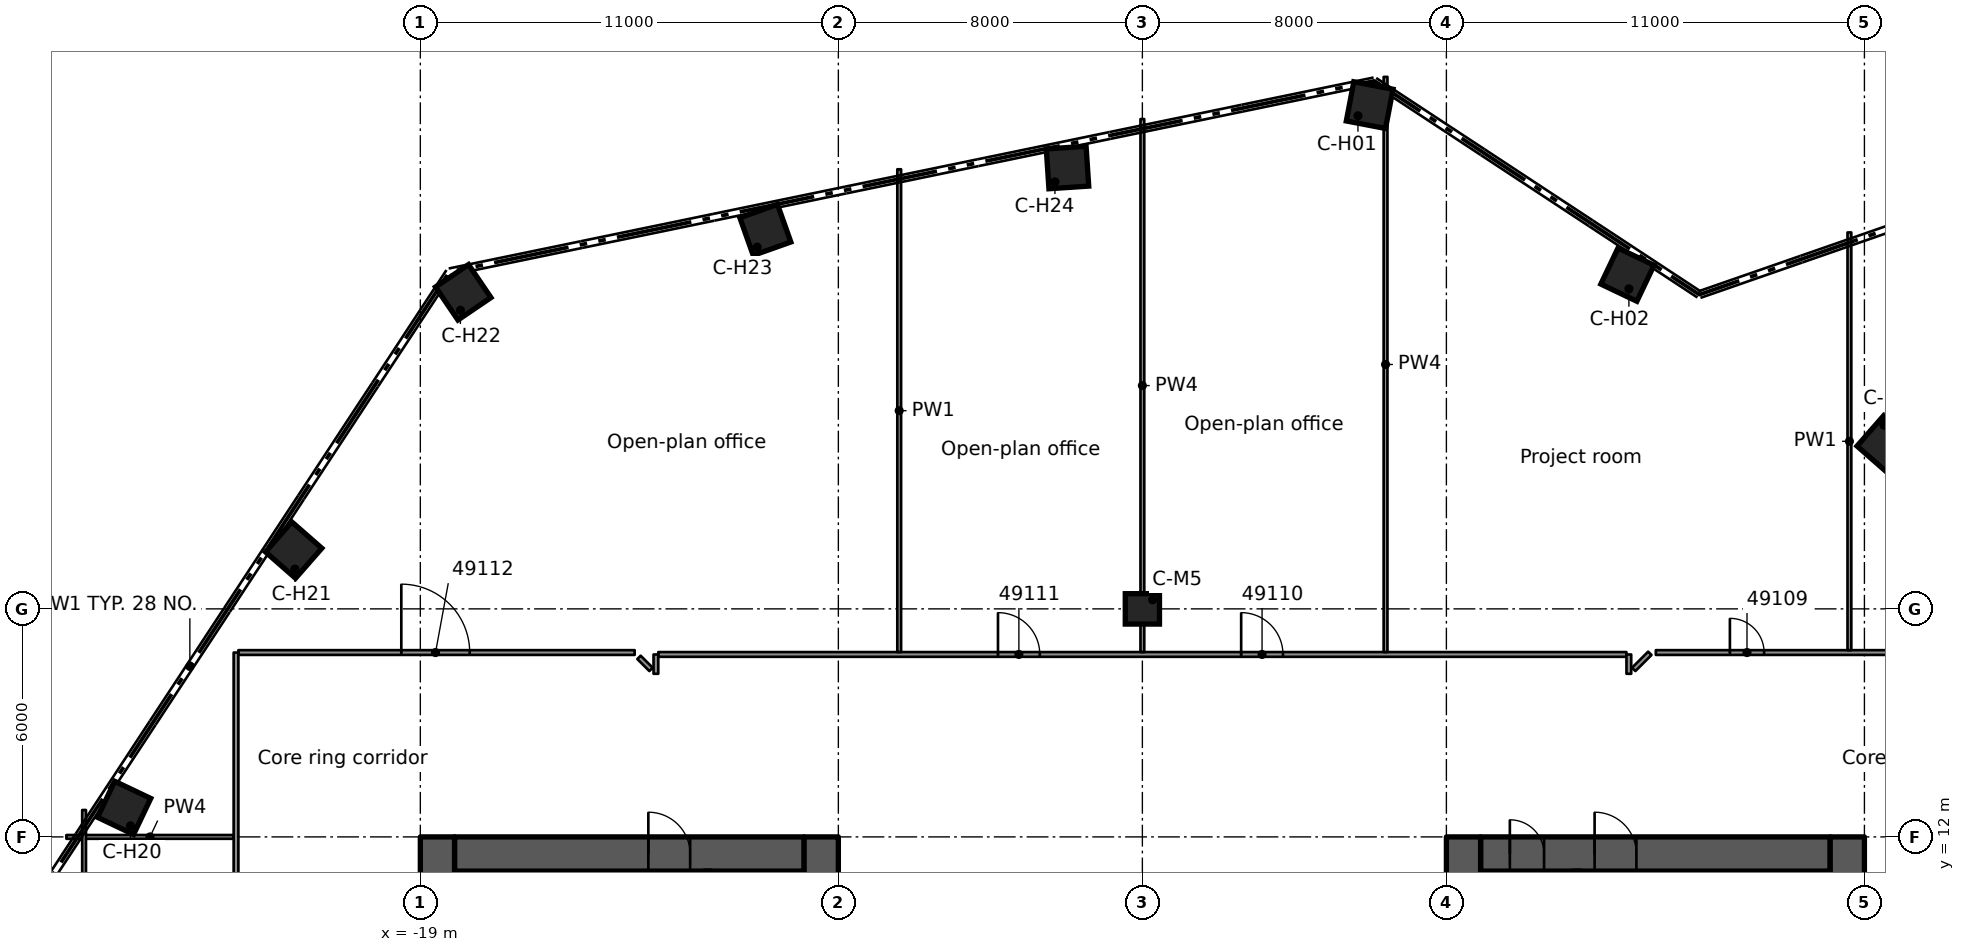
"""IFC4 building model, lengths in metres.
Left out: names, types, materials, properties, quantities, classifications, styles, units other than length and angle.
Written with IfcOpenShell. Run it as: python <this file> out.ifc"""

import sys

from ifc_helpers import new_model, si_unit, direction, frame, frame_2d, origin, origin_2d, place, context, subcontext, project, spatial, rectangle, extrude, element, fill, save


model = new_model("IFC4")
c1 = context("Model", 3, precision=1e-05, world=origin(), true_north=direction((0.0, 1.0)))
c2 = subcontext(c1, "Body", "Model", "MODEL_VIEW")
j1 = project(units=[si_unit("LENGTHUNIT", "METRE"), si_unit("PLANEANGLEUNIT", "RADIAN")], contexts=[c1])
p1 = place(None, origin())
s1 = spatial("IfcSite", under=j1, at=p1, CompositionType="ELEMENT")
p2 = place(p1, origin())
s2 = spatial("IfcBuilding", under=s1, at=p2, CompositionType="ELEMENT")
p3 = place(p2, frame((0.0, 0.0, 246.0)))
s3 = spatial("IfcBuildingStorey", under=s2, at=p3, CompositionType="ELEMENT", Elevation=246.0)
p4 = place(p3, frame((-18.1, 11.55, 0.0), z_axis=(0.0, 0.0, 1.0), x_axis=(1.0, 0.0, 0.0)))
e1 = element("IfcWall", 1, at=p4, inside=s3, PredefinedType="SHEAR", context=c2, shape_type="SweptSolid", body=[
    extrude(rectangle(XDim=9.2, YDim=0.9, at=frame_2d((4.6, 0.0))), origin(), (0.0, 0.0, 1.0), 3.5),
])
p5 = place(p4, frame((5.1, 0.0, 0.0)))
e2 = element("IfcOpeningElement", 2, at=p5, cuts=e1, PredefinedType="OPENING", context=c2, shape_type="SweptSolid", body=[
    extrude(rectangle(XDim=1.1, YDim=2.1, at=frame_2d((0.55, 1.05))), frame((0.0, 0.46, 0.0), z_axis=(0.0, -1.0, 0.0), x_axis=(1.0, 0.0, 0.0)), (0.0, 0.0, 1.0), 0.92),
])
p6 = place(p3, frame((-18.55, -12.0, 0.0), z_axis=(0.0, 0.0, 1.0), x_axis=(0.0, 1.0, 0.0)))
e3 = element("IfcWall", 3, at=p6, inside=s3, PredefinedType="SHEAR", context=c2, shape_type="SweptSolid", body=[
    extrude(rectangle(XDim=24.0, YDim=0.9, at=frame_2d((12.0, 0.0))), origin(), (0.0, 0.0, 1.0), 3.5),
])
p7 = place(p6, frame((10.1, 0.0, 0.0)))
e4 = element("IfcOpeningElement", 4, at=p7, cuts=e3, PredefinedType="OPENING", context=c2, shape_type="SweptSolid", body=[
    extrude(rectangle(XDim=1.8, YDim=2.1, at=frame_2d((0.9, 1.05))), frame((0.0, 0.46, 0.0), z_axis=(0.0, -1.0, 0.0), x_axis=(1.0, 0.0, 0.0)), (0.0, 0.0, 1.0), 0.92),
])
p8 = place(p3, frame((-8.45, -12.0, 0.0), z_axis=(0.0, 0.0, 1.0), x_axis=(0.0, 1.0, 0.0)))
e5 = element("IfcWall", 5, at=p8, inside=s3, PredefinedType="SHEAR", context=c2, shape_type="SweptSolid", body=[
    extrude(rectangle(XDim=24.0, YDim=0.9, at=frame_2d((12.0, 0.0))), origin(), (0.0, 0.0, 1.0), 3.5),
])
p9 = place(p8, frame((9.6, 0.0, 0.0)))
e6 = element("IfcOpeningElement", 6, at=p9, cuts=e5, PredefinedType="OPENING", context=c2, shape_type="SweptSolid", body=[
    extrude(rectangle(XDim=1.8, YDim=2.1, at=frame_2d((0.9, 1.05))), frame((0.0, 0.46, 0.0), z_axis=(0.0, -1.0, 0.0), x_axis=(1.0, 0.0, 0.0)), (0.0, 0.0, 1.0), 0.92),
])
p10 = place(p8, frame((19.65, 0.0, 0.0)))
e7 = element("IfcOpeningElement", 7, at=p10, cuts=e5, PredefinedType="OPENING", context=c2, shape_type="SweptSolid", body=[
    extrude(rectangle(XDim=1.1, YDim=2.1, at=frame_2d((0.55, 1.05))), frame((0.0, 0.46, 0.0), z_axis=(0.0, -1.0, 0.0), x_axis=(1.0, 0.0, 0.0)), (0.0, 0.0, 1.0), 0.92),
])
p11 = place(p3, frame((8.9, 11.55, 0.0), z_axis=(0.0, 0.0, 1.0), x_axis=(1.0, 0.0, 0.0)))
e8 = element("IfcWall", 8, at=p11, inside=s3, PredefinedType="SHEAR", context=c2, shape_type="SweptSolid", body=[
    extrude(rectangle(XDim=9.2, YDim=0.9, at=frame_2d((4.6, 0.0))), origin(), (0.0, 0.0, 1.0), 3.5),
])
p12 = place(p11, frame((3.0, 0.0, 0.0)))
e9 = element("IfcOpeningElement", 9, at=p12, cuts=e8, PredefinedType="OPENING", context=c2, shape_type="SweptSolid", body=[
    extrude(rectangle(XDim=1.1, YDim=2.1, at=frame_2d((0.55, 1.05))), frame((0.0, 0.46, 0.0), z_axis=(0.0, -1.0, 0.0), x_axis=(1.0, 0.0, 0.0)), (0.0, 0.0, 1.0), 0.92),
])
p13 = place(p11, frame((0.77, 0.0, 0.0)))
e10 = element("IfcOpeningElement", 10, at=p13, cuts=e8, PredefinedType="OPENING", context=c2, shape_type="SweptSolid", body=[
    extrude(rectangle(XDim=0.9, YDim=2.1, at=frame_2d((0.45, 1.05))), frame((0.0, 0.46, 0.0), z_axis=(0.0, -1.0, 0.0), x_axis=(1.0, 0.0, 0.0)), (0.0, 0.0, 1.0), 0.92),
])
p14 = place(p3, frame((8.45, -12.0, 0.0), z_axis=(0.0, 0.0, 1.0), x_axis=(0.0, 1.0, 0.0)))
e11 = element("IfcWall", 11, at=p14, inside=s3, PredefinedType="SHEAR", context=c2, shape_type="SweptSolid", body=[
    extrude(rectangle(XDim=24.0, YDim=0.9, at=frame_2d((12.0, 0.0))), origin(), (0.0, 0.0, 1.0), 3.5),
])
p15 = place(p14, frame((12.6, 0.0, 0.0)))
e12 = element("IfcOpeningElement", 12, at=p15, cuts=e11, PredefinedType="OPENING", context=c2, shape_type="SweptSolid", body=[
    extrude(rectangle(XDim=1.8, YDim=2.1, at=frame_2d((0.9, 1.05))), frame((0.0, 0.46, 0.0), z_axis=(0.0, -1.0, 0.0), x_axis=(1.0, 0.0, 0.0)), (0.0, 0.0, 1.0), 0.92),
])
p16 = place(p14, frame((3.25, 0.0, 0.0)))
e13 = element("IfcOpeningElement", 13, at=p16, cuts=e11, PredefinedType="OPENING", context=c2, shape_type="SweptSolid", body=[
    extrude(rectangle(XDim=1.1, YDim=2.1, at=frame_2d((0.55, 1.05))), frame((0.0, 0.46, 0.0), z_axis=(0.0, -1.0, 0.0), x_axis=(1.0, 0.0, 0.0)), (0.0, 0.0, 1.0), 0.92),
])
p17 = place(p3, frame((18.55, -12.0, 0.0), z_axis=(0.0, 0.0, 1.0), x_axis=(0.0, 1.0, 0.0)))
e14 = element("IfcWall", 14, at=p17, inside=s3, PredefinedType="SHEAR", context=c2, shape_type="SweptSolid", body=[
    extrude(rectangle(XDim=24.0, YDim=0.9, at=frame_2d((12.0, 0.0))), origin(), (0.0, 0.0, 1.0), 3.5),
])
p18 = place(p17, frame((12.1, 0.0, 0.0)))
e15 = element("IfcOpeningElement", 15, at=p18, cuts=e14, PredefinedType="OPENING", context=c2, shape_type="SweptSolid", body=[
    extrude(rectangle(XDim=1.8, YDim=2.1, at=frame_2d((0.9, 1.05))), frame((0.0, 0.46, 0.0), z_axis=(0.0, -1.0, 0.0), x_axis=(1.0, 0.0, 0.0)), (0.0, 0.0, 1.0), 0.92),
])
for number, where, z_axis, x_axis in (
    (16, (5.981, 31.255, 0.0), (0.0, 0.0, 1.0), (0.188, 0.982, 0.0)),
    (17, (12.764, 26.794, 0.0), (0.0, 0.0, 1.0), (0.43, 0.903, 0.0)),
    (18, (19.547, 22.333, 0.0), (0.0, 0.0, 1.0), (0.659, 0.752, 0.0)),
    (19, (-26.794, 12.764, 0.0), (0.0, 0.0, 1.0), (-0.903, 0.43, 0.0)),
    (20, (-22.333, 19.547, 0.0), (0.0, 0.0, 1.0), (-0.752, 0.659, 0.0)),
    (21, (-17.871, 26.33, 0.0), (0.0, 0.0, 1.0), (-0.562, 0.827, 0.0)),
    (22, (-9.921, 27.972, 0.0), (0.0, 0.0, 1.0), (-0.334, 0.942, 0.0)),
    (23, (-1.97, 29.613, 0.0), (0.0, 0.0, 1.0), (-0.066, 0.998, 0.0)),
):
    element("IfcColumn", number, at=place(p3, frame(where, z_axis=z_axis, x_axis=x_axis)), inside=s3, PredefinedType="COLUMN", context=c2, shape_type="SweptSolid", body=[
        extrude(rectangle(XDim=1.05, YDim=1.05, at=origin_2d()), origin(), (0.0, 0.0, 1.0), 3.5),
    ])
p19 = place(p3, frame((0.0, 18.0, 0.0), z_axis=(0.0, 0.0, 1.0), x_axis=(1.0, 0.0, 0.0)))
e24 = element("IfcColumn", 24, at=p19, inside=s3, PredefinedType="COLUMN", context=c2, shape_type="SweptSolid", body=[
    extrude(rectangle(XDim=0.9, YDim=0.8, at=origin_2d()), origin(), (0.0, 0.0, 1.0), 3.5),
])
p20 = place(p3, frame((-11.44, 6.975, 0.0), z_axis=(0.0, 0.0, 1.0), x_axis=(0.0, 1.0, 0.0)))
e25 = element("IfcWall", 25, at=p20, inside=s3, PredefinedType="SOLIDWALL", context=c2, shape_type="SweptSolid", body=[
    extrude(rectangle(XDim=4.125, YDim=0.2, at=frame_2d((2.062, 0.0))), origin(), (0.0, 0.0, 1.0), 3.08),
])
p21 = place(p20, frame((2.1, 0.0, 0.0)))
e26 = element("IfcOpeningElement", 26, at=p21, cuts=e25, PredefinedType="OPENING", context=c2, shape_type="SweptSolid", body=[
    extrude(rectangle(XDim=1.1, YDim=2.1, at=frame_2d((0.55, 1.05))), frame((0.0, 0.11, 0.0), z_axis=(0.0, -1.0, 0.0), x_axis=(1.0, 0.0, 0.0)), (0.0, 0.0, 1.0), 0.22),
])
p22 = place(p3, frame((11.44, 11.1, 0.0), z_axis=(0.0, 0.0, 1.0), x_axis=(0.0, -1.0, 0.0)))
e27 = element("IfcWall", 27, at=p22, inside=s3, PredefinedType="SOLIDWALL", context=c2, shape_type="SweptSolid", body=[
    extrude(rectangle(XDim=4.125, YDim=0.2, at=frame_2d((2.062, 0.0))), origin(), (0.0, 0.0, 1.0), 3.08),
])
p23 = place(p3, frame((-13.246, 16.724, 0.0), z_axis=(0.0, 0.0, 1.0), x_axis=(0.707106781187, -0.707106781187, 0.0)))
e28 = element("IfcWall", 28, at=p23, inside=s3, PredefinedType="PARTITIONING", context=c2, shape_type="SweptSolid", body=[
    extrude(rectangle(XDim=0.448, YDim=0.125, at=frame_2d((0.224, 0.0))), origin(), (0.0, 0.0, 1.0), 3.06),
])
p24 = place(p3, frame((-28.314, 12.0, 0.0), z_axis=(0.0, 0.0, 1.0), x_axis=(1.0, 0.0, 0.0)))
e29 = element("IfcWall", 29, at=p24, inside=s3, PredefinedType="PARTITIONING", context=c2, shape_type="SweptSolid", body=[
    extrude(rectangle(XDim=4.401, YDim=0.1, at=frame_2d((2.2, 0.0))), origin(), (0.0, 0.0, 1.0), 2.425),
])
p25 = place(p3, frame((-12.738, 16.801, 0.0), z_axis=(0.0, 0.0, 1.0), x_axis=(1.0, 0.0, 0.0)))
e30 = element("IfcWall", 30, at=p25, inside=s3, PredefinedType="PARTITIONING", context=c2, shape_type="SweptSolid", body=[
    extrude(rectangle(XDim=25.476, YDim=0.125, at=frame_2d((12.738, 0.0))), origin(), (0.0, 0.0, 1.0), 3.06),
])
p26 = place(p25, frame((15.337, 0.0, 0.0)))
e31 = element("IfcOpeningElement", 31, at=p26, cuts=e30, PredefinedType="OPENING", context=c2, shape_type="SweptSolid", body=[
    extrude(rectangle(XDim=1.1, YDim=2.1, at=frame_2d((0.55, 1.05))), frame((0.0, 0.073, 0.0), z_axis=(0.0, -1.0, 0.0), x_axis=(1.0, 0.0, 0.0)), (0.0, 0.0, 1.0), 0.145),
])
p27 = place(p25, frame((8.938, 0.0, 0.0)))
e32 = element("IfcOpeningElement", 32, at=p27, cuts=e30, PredefinedType="OPENING", context=c2, shape_type="SweptSolid", body=[
    extrude(rectangle(XDim=1.1, YDim=2.1, at=frame_2d((0.55, 1.05))), frame((0.0, 0.073, 0.0), z_axis=(0.0, -1.0, 0.0), x_axis=(1.0, 0.0, 0.0)), (0.0, 0.0, 1.0), 0.145),
])
p28 = place(p3, frame((-23.788, 16.851, 0.0), z_axis=(0.0, 0.0, 1.0), x_axis=(1.0, 0.0, 0.0)))
e33 = element("IfcWall", 33, at=p28, inside=s3, PredefinedType="PARTITIONING", context=c2, shape_type="SweptSolid", body=[
    extrude(rectangle(XDim=10.428, YDim=0.125, at=frame_2d((5.214, 0.0))), origin(), (0.0, 0.0, 1.0), 3.06),
])
p29 = place(p28, frame((4.288, 0.0, 0.0)))
e34 = element("IfcOpeningElement", 34, at=p29, cuts=e33, PredefinedType="OPENING", context=c2, shape_type="SweptSolid", body=[
    extrude(rectangle(XDim=1.8, YDim=2.1, at=frame_2d((0.9, 1.05))), frame((0.0, 0.073, 0.0), z_axis=(0.0, -1.0, 0.0), x_axis=(1.0, 0.0, 0.0)), (0.0, 0.0, 1.0), 0.145),
])
p30 = place(p3, frame((13.511, 16.851, 0.0), z_axis=(0.0, 0.0, 1.0), x_axis=(1.0, 0.0, 0.0)))
e35 = element("IfcWall", 35, at=p30, inside=s3, PredefinedType="PARTITIONING", context=c2, shape_type="SweptSolid", body=[
    extrude(rectangle(XDim=10.276, YDim=0.125, at=frame_2d((5.138, 0.0))), origin(), (0.0, 0.0, 1.0), 3.06),
])
p31 = place(p30, frame((7.194, 0.0, 0.0)))
e36 = element("IfcOpeningElement", 36, at=p31, cuts=e35, PredefinedType="OPENING", context=c2, shape_type="SweptSolid", body=[
    extrude(rectangle(XDim=0.9, YDim=2.1, at=frame_2d((0.45, 1.05))), frame((0.0, 0.073, 0.0), z_axis=(0.0, -1.0, 0.0), x_axis=(1.0, 0.0, 0.0)), (0.0, 0.0, 1.0), 0.145),
])
p32 = place(p30, frame((1.949, 0.0, 0.0)))
e37 = element("IfcOpeningElement", 37, at=p32, cuts=e35, PredefinedType="OPENING", context=c2, shape_type="SweptSolid", body=[
    extrude(rectangle(XDim=0.9, YDim=2.1, at=frame_2d((0.45, 1.05))), frame((0.0, 0.073, 0.0), z_axis=(0.0, -1.0, 0.0), x_axis=(1.0, 0.0, 0.0)), (0.0, 0.0, 1.0), 0.145),
])
p33 = place(p3, frame((12.929, 16.407, 0.0), z_axis=(0.0, 0.0, 1.0), x_axis=(0.707106781187, 0.707106781187, 0.0)))
e38 = element("IfcWall", 38, at=p33, inside=s3, PredefinedType="PARTITIONING", context=c2, shape_type="SweptSolid", body=[
    extrude(rectangle(XDim=0.6, YDim=0.125, at=frame_2d((0.3, 0.0))), origin(), (0.0, 0.0, 1.0), 3.06),
])
p34 = place(p3, frame((18.605, 16.913, 0.0), z_axis=(0.0, 0.0, 1.0), x_axis=(0.0, 1.0, 0.0)))
e39 = element("IfcWall", 39, at=p34, inside=s3, PredefinedType="PARTITIONING", context=c2, shape_type="SweptSolid", body=[
    extrude(rectangle(XDim=10.992, YDim=0.1, at=frame_2d((5.496, 0.0))), origin(), (0.0, 0.0, 1.0), 3.06),
])
p35 = place(p3, frame((12.801, 16.292, 0.0), z_axis=(0.0, 0.0, 1.0), x_axis=(0.0, 1.0, 0.0)))
e40 = element("IfcWall", 40, at=p35, inside=s3, PredefinedType="PARTITIONING", context=c2, shape_type="SweptSolid", body=[
    extrude(rectangle(XDim=0.508, YDim=0.125, at=frame_2d((0.254, 0.0))), origin(), (0.0, 0.0, 1.0), 3.06),
])
p36 = place(p3, frame((6.399, 16.863, 0.0), z_axis=(0.0, 0.0, 1.0), x_axis=(0.0, 1.0, 0.0)))
e41 = element("IfcWall", 41, at=p36, inside=s3, PredefinedType="PARTITIONING", context=c2, shape_type="SweptSolid", body=[
    extrude(rectangle(XDim=15.135, YDim=0.1, at=frame_2d((7.567, 0.0))), origin(), (0.0, 0.0, 1.0), 2.425),
])
p37 = place(p3, frame((0.0, 16.863, 0.0), z_axis=(0.0, 0.0, 1.0), x_axis=(0.0, 1.0, 0.0)))
e42 = element("IfcWall", 42, at=p37, inside=s3, PredefinedType="PARTITIONING", context=c2, shape_type="SweptSolid", body=[
    extrude(rectangle(XDim=14.025, YDim=0.1, at=frame_2d((7.012, 0.0))), origin(), (0.0, 0.0, 1.0), 2.425),
])
p38 = place(p3, frame((-6.399, 16.863, 0.0), z_axis=(0.0, 0.0, 1.0), x_axis=(0.0, 1.0, 0.0)))
e43 = element("IfcWall", 43, at=p38, inside=s3, PredefinedType="PARTITIONING", context=c2, shape_type="SweptSolid", body=[
    extrude(rectangle(XDim=12.704, YDim=0.1, at=frame_2d((6.352, 0.0))), origin(), (0.0, 0.0, 1.0), 3.06),
])
p39 = place(p3, frame((-12.801, 16.292, 0.0), z_axis=(0.0, 0.0, 1.0), x_axis=(0.0, 1.0, 0.0)))
e44 = element("IfcWall", 44, at=p39, inside=s3, PredefinedType="PARTITIONING", context=c2, shape_type="SweptSolid", body=[
    extrude(rectangle(XDim=0.508, YDim=0.125, at=frame_2d((0.254, 0.0))), origin(), (0.0, 0.0, 1.0), 3.06),
])
p40 = place(p3, frame((-23.85, -16.85, 0.0), z_axis=(0.0, 0.0, 1.0), x_axis=(0.0, 1.0, 0.0)))
e45 = element("IfcWall", 45, at=p40, inside=s3, PredefinedType="PARTITIONING", context=c2, shape_type="SweptSolid", body=[
    extrude(rectangle(XDim=33.701, YDim=0.125, at=frame_2d((16.851, 0.0))), origin(), (0.0, 0.0, 1.0), 3.06),
])
p41 = place(p40, frame((10.2, 0.0, 0.0)))
e46 = element("IfcOpeningElement", 46, at=p41, cuts=e45, PredefinedType="OPENING", context=c2, shape_type="SweptSolid", body=[
    extrude(rectangle(XDim=1.1, YDim=2.1, at=frame_2d((0.55, 1.05))), frame((0.0, 0.073, 0.0), z_axis=(0.0, -1.0, 0.0), x_axis=(1.0, 0.0, 0.0)), (0.0, 0.0, 1.0), 0.145),
])
p42 = place(p40, frame((25.451, 0.0, 0.0)))
e47 = element("IfcOpeningElement", 47, at=p42, cuts=e45, PredefinedType="OPENING", context=c2, shape_type="SweptSolid", body=[
    extrude(rectangle(XDim=0.9, YDim=2.1, at=frame_2d((0.45, 1.05))), frame((0.0, 0.073, 0.0), z_axis=(0.0, -1.0, 0.0), x_axis=(1.0, 0.0, 0.0)), (0.0, 0.0, 1.0), 0.145),
])
p43 = place(p40, frame((19.202, 0.0, 0.0)))
e48 = element("IfcOpeningElement", 48, at=p43, cuts=e45, PredefinedType="OPENING", context=c2, shape_type="SweptSolid", body=[
    extrude(rectangle(XDim=1.1, YDim=2.1, at=frame_2d((0.55, 1.05))), frame((0.0, 0.073, 0.0), z_axis=(0.0, -1.0, 0.0), x_axis=(1.0, 0.0, 0.0)), (0.0, 0.0, 1.0), 0.145),
])
p44 = place(p3, frame((-27.848, 6.001, 0.0), z_axis=(0.0, 0.0, 1.0), x_axis=(0.0, 1.0, 0.0)))
e49 = element("IfcWall", 49, at=p44, inside=s3, PredefinedType="PARTITIONING", context=c2, shape_type="SweptSolid", body=[
    extrude(rectangle(XDim=6.707, YDim=0.1, at=frame_2d((3.354, 0.0))), origin(), (0.0, 0.0, 1.0), 2.425),
])
p45 = place(p5, origin())
e50 = element("IfcDoor", 50, at=p45, inside=s3, OperationType="SINGLE_SWING_RIGHT", PredefinedType="DOOR", context=c2, shape_type="SweptSolid", body=[
    extrude(rectangle(XDim=1.1, YDim=2.1, at=frame_2d((0.55, 1.05))), frame((0.0, 0.025, 0.0), z_axis=(0.0, -1.0, 0.0), x_axis=(1.0, 0.0, 0.0)), (0.0, 0.0, 1.0), 0.05),
])
fill(e2, e50)
p46 = place(p12, origin())
e51 = element("IfcDoor", 51, at=p46, inside=s3, OperationType="SINGLE_SWING_LEFT", PredefinedType="DOOR", context=c2, shape_type="SweptSolid", body=[
    extrude(rectangle(XDim=1.1, YDim=2.1, at=frame_2d((0.55, 1.05))), frame((0.0, 0.025, 0.0), z_axis=(0.0, -1.0, 0.0), x_axis=(1.0, 0.0, 0.0)), (0.0, 0.0, 1.0), 0.05),
])
fill(e9, e51)
p47 = place(p13, origin())
e52 = element("IfcDoor", 52, at=p47, inside=s3, OperationType="SINGLE_SWING_LEFT", PredefinedType="DOOR", context=c2, shape_type="SweptSolid", body=[
    extrude(rectangle(XDim=0.9, YDim=2.1, at=frame_2d((0.45, 1.05))), frame((0.0, 0.025, 0.0), z_axis=(0.0, -1.0, 0.0), x_axis=(1.0, 0.0, 0.0)), (0.0, 0.0, 1.0), 0.05),
])
fill(e10, e52)
p48 = place(p32, origin())
e53 = element("IfcDoor", 53, at=p48, inside=s3, OperationType="SINGLE_SWING_LEFT", PredefinedType="DOOR", context=c2, shape_type="SweptSolid", body=[
    extrude(rectangle(XDim=0.9, YDim=2.1, at=frame_2d((0.45, 1.05))), frame((0.0, 0.025, 0.0), z_axis=(0.0, -1.0, 0.0), x_axis=(1.0, 0.0, 0.0)), (0.0, 0.0, 1.0), 0.05),
])
fill(e37, e53)
p49 = place(p26, origin())
e54 = element("IfcDoor", 54, at=p49, inside=s3, OperationType="SINGLE_SWING_RIGHT", PredefinedType="DOOR", context=c2, shape_type="SweptSolid", body=[
    extrude(rectangle(XDim=1.1, YDim=2.1, at=frame_2d((0.55, 1.05))), frame((0.0, 0.025, 0.0), z_axis=(0.0, -1.0, 0.0), x_axis=(1.0, 0.0, 0.0)), (0.0, 0.0, 1.0), 0.05),
])
fill(e31, e54)
p50 = place(p27, origin())
e55 = element("IfcDoor", 55, at=p50, inside=s3, OperationType="SINGLE_SWING_LEFT", PredefinedType="DOOR", context=c2, shape_type="SweptSolid", body=[
    extrude(rectangle(XDim=1.1, YDim=2.1, at=frame_2d((0.55, 1.05))), frame((0.0, 0.025, 0.0), z_axis=(0.0, -1.0, 0.0), x_axis=(1.0, 0.0, 0.0)), (0.0, 0.0, 1.0), 0.05),
])
fill(e32, e55)
p51 = place(p29, origin())
e56 = element("IfcDoor", 56, at=p51, inside=s3, OperationType="DOUBLE_DOOR_SINGLE_SWING", PredefinedType="DOOR", context=c2, shape_type="SweptSolid", body=[
    extrude(rectangle(XDim=1.8, YDim=2.1, at=frame_2d((0.9, 1.05))), frame((0.0, 0.025, 0.0), z_axis=(0.0, -1.0, 0.0), x_axis=(1.0, 0.0, 0.0)), (0.0, 0.0, 1.0), 0.05),
])
fill(e34, e56)
save(model, sys.argv[1])
